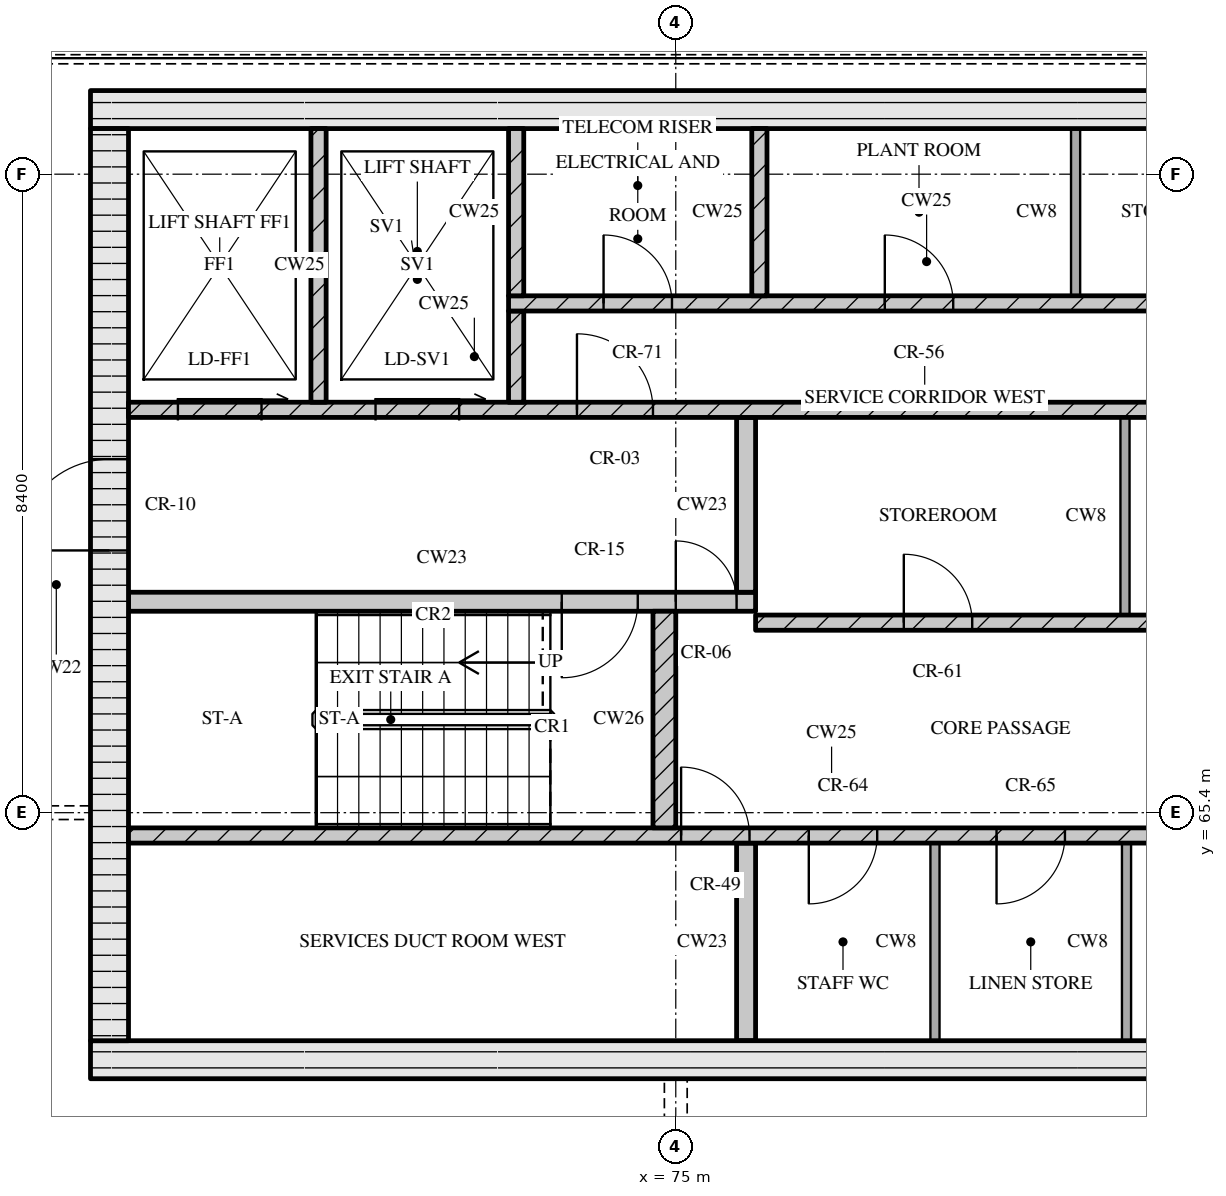
"""IFC4 building model, lengths in metres.
Left out: names, types, materials, properties, quantities, classifications, styles, units other than length and angle.
Written with IfcOpenShell. Run it as: python <this file> out.ifc"""

import sys

from ifc_helpers import new_model, si_unit, direction, frame, frame_2d, origin, place, context, subcontext, project, spatial, rectangle, extrude, element, fill, save


model = new_model("IFC4")
c1 = context("Model", 3, precision=1e-05, world=origin(), true_north=direction((0.0, 1.0)))
c2 = subcontext(c1, "Body", "Model", "MODEL_VIEW")
j1 = project(units=[si_unit("LENGTHUNIT", "METRE"), si_unit("PLANEANGLEUNIT", "RADIAN")], contexts=[c1])
p1 = place(None, origin())
s1 = spatial("IfcSite", under=j1, at=p1, CompositionType="ELEMENT")
p2 = place(p1, origin())
s2 = spatial("IfcBuilding", under=s1, at=p2, CompositionType="ELEMENT")
p3 = place(p2, frame((0.0, 0.0, 310.35)))
s3 = spatial("IfcBuildingStorey", under=s2, at=p3, CompositionType="ELEMENT", Elevation=310.35)
p4 = place(p3, frame((67.3, 62.15, 0.0), z_axis=(0.0, 0.0, 1.0), x_axis=(1.0, 0.0, 0.0)))
e1 = element("IfcWall", 1, at=p4, inside=s3, PredefinedType="SOLIDWALL", context=c2, shape_type="SweptSolid", body=[
    extrude(rectangle(XDim=40.6, YDim=0.5, at=frame_2d((20.3, 0.0))), origin(), (0.0, 0.0, 1.0), 4.2),
])
p5 = place(p4, frame((20.65, 0.0, 0.0)))
e2 = element("IfcOpeningElement", 2, at=p5, cuts=e1, PredefinedType="OPENING", context=c2, shape_type="SweptSolid", body=[
    extrude(rectangle(XDim=1.8, YDim=2.1, at=frame_2d((0.9, 1.05))), frame((0.0, 0.26, 0.0), z_axis=(0.0, -1.0, 0.0), x_axis=(1.0, 0.0, 0.0)), (0.0, 0.0, 1.0), 0.52),
])
p6 = place(p3, frame((67.3, 74.65, 0.0), z_axis=(0.0, 0.0, 1.0), x_axis=(1.0, 0.0, 0.0)))
e3 = element("IfcWall", 3, at=p6, inside=s3, PredefinedType="SOLIDWALL", context=c2, shape_type="SweptSolid", body=[
    extrude(rectangle(XDim=40.6, YDim=0.5, at=frame_2d((20.3, 0.0))), origin(), (0.0, 0.0, 1.0), 4.2),
])
p7 = place(p3, frame((67.55, 62.4, 0.0), z_axis=(0.0, 0.0, 1.0), x_axis=(0.0, 1.0, 0.0)))
e4 = element("IfcWall", 4, at=p7, inside=s3, PredefinedType="SOLIDWALL", context=c2, shape_type="SweptSolid", body=[
    extrude(rectangle(XDim=12.0, YDim=0.5, at=frame_2d((6.0, 0.0))), origin(), (0.0, 0.0, 1.0), 4.2),
])
p8 = place(p7, frame((6.45, 0.0, 0.0)))
e5 = element("IfcOpeningElement", 5, at=p8, cuts=e4, PredefinedType="OPENING", context=c2, shape_type="SweptSolid", body=[
    extrude(rectangle(XDim=1.2, YDim=2.1, at=frame_2d((0.6, 1.05))), frame((0.0, 0.26, 0.0), z_axis=(0.0, -1.0, 0.0), x_axis=(1.0, 0.0, 0.0)), (0.0, 0.0, 1.0), 0.52),
])
p9 = place(p3, frame((75.925, 62.4, 0.0), z_axis=(0.0, 0.0, 1.0), x_axis=(0.0, 1.0, 0.0)))
e6 = element("IfcWall", 6, at=p9, inside=s3, PredefinedType="SOLIDWALL", context=c2, shape_type="SweptSolid", body=[
    extrude(rectangle(XDim=2.6, YDim=0.25, at=frame_2d((1.3, 0.0))), origin(), (0.0, 0.0, 1.0), 4.2),
])
for number, where, z_axis, x_axis in (
    (7, (78.41, 62.4, 0.0), (0.0, 0.0, 1.0), (0.0, 1.0, 0.0)),
    (8, (80.93, 62.4, 0.0), (0.0, 0.0, 1.0), (0.0, 1.0, 0.0)),
):
    element("IfcWall", number, at=place(p3, frame(where, z_axis=z_axis, x_axis=x_axis)), inside=s3, PredefinedType="PARTITIONING", context=c2, shape_type="SweptSolid", body=[
        extrude(rectangle(XDim=2.6, YDim=0.12, at=frame_2d((1.3, 0.0))), origin(), (0.0, 0.0, 1.0), 4.2),
    ])
p10 = place(p3, frame((67.8, 65.1, 0.0), z_axis=(0.0, 0.0, 1.0), x_axis=(1.0, 0.0, 0.0)))
e9 = element("IfcWall", 9, at=p10, inside=s3, PredefinedType="SOLIDWALL", context=c2, shape_type="SweptSolid", body=[
    extrude(rectangle(XDim=18.5, YDim=0.2, at=frame_2d((9.25, 0.0))), origin(), (0.0, 0.0, 1.0), 4.2),
])
p11 = place(p10, frame((7.27, 0.0, 0.0)))
e10 = element("IfcOpeningElement", 10, at=p11, cuts=e9, PredefinedType="OPENING", context=c2, shape_type="SweptSolid", body=[
    extrude(rectangle(XDim=0.9, YDim=2.1, at=frame_2d((0.45, 1.05))), frame((0.0, 0.11, 0.0), z_axis=(0.0, -1.0, 0.0), x_axis=(1.0, 0.0, 0.0)), (0.0, 0.0, 1.0), 0.22),
])
p12 = place(p10, frame((8.95, 0.0, 0.0)))
e11 = element("IfcOpeningElement", 11, at=p12, cuts=e9, PredefinedType="OPENING", context=c2, shape_type="SweptSolid", body=[
    extrude(rectangle(XDim=0.9, YDim=2.1, at=frame_2d((0.45, 1.05))), frame((0.0, 0.11, 0.0), z_axis=(0.0, -1.0, 0.0), x_axis=(1.0, 0.0, 0.0)), (0.0, 0.0, 1.0), 0.22),
])
p13 = place(p10, frame((11.42, 0.0, 0.0)))
e12 = element("IfcOpeningElement", 12, at=p13, cuts=e9, PredefinedType="OPENING", context=c2, shape_type="SweptSolid", body=[
    extrude(rectangle(XDim=0.9, YDim=2.1, at=frame_2d((0.45, 1.05))), frame((0.0, 0.11, 0.0), z_axis=(0.0, -1.0, 0.0), x_axis=(1.0, 0.0, 0.0)), (0.0, 0.0, 1.0), 0.22),
])
p14 = place(p10, frame((13.92, 0.0, 0.0)))
e13 = element("IfcOpeningElement", 13, at=p14, cuts=e9, PredefinedType="OPENING", context=c2, shape_type="SweptSolid", body=[
    extrude(rectangle(XDim=0.9, YDim=2.1, at=frame_2d((0.45, 1.05))), frame((0.0, 0.11, 0.0), z_axis=(0.0, -1.0, 0.0), x_axis=(1.0, 0.0, 0.0)), (0.0, 0.0, 1.0), 0.22),
])
p15 = place(p10, frame((16.7, 0.0, 0.0)))
e14 = element("IfcOpeningElement", 14, at=p15, cuts=e9, PredefinedType="OPENING", context=c2, shape_type="SweptSolid", body=[
    extrude(rectangle(XDim=0.9, YDim=2.1, at=frame_2d((0.45, 1.05))), frame((0.0, 0.11, 0.0), z_axis=(0.0, -1.0, 0.0), x_axis=(1.0, 0.0, 0.0)), (0.0, 0.0, 1.0), 0.22),
])
p16 = place(p3, frame((74.85, 65.2, 0.0), z_axis=(0.0, 0.0, 1.0), x_axis=(0.0, 1.0, 0.0)))
e15 = element("IfcWall", 15, at=p16, inside=s3, PredefinedType="SOLIDWALL", context=c2, shape_type="SweptSolid", body=[
    extrude(rectangle(XDim=2.85, YDim=0.3, at=frame_2d((1.425, 0.0))), origin(), (0.0, 0.0, 1.0), 4.2),
])
p17 = place(p3, frame((76.05, 67.9, 0.0), z_axis=(0.0, 0.0, 1.0), x_axis=(1.0, 0.0, 0.0)))
e16 = element("IfcWall", 16, at=p17, inside=s3, PredefinedType="SOLIDWALL", context=c2, shape_type="SweptSolid", body=[
    extrude(rectangle(XDim=23.1, YDim=0.2, at=frame_2d((11.55, 0.0))), origin(), (0.0, 0.0, 1.0), 4.2),
])
p18 = place(p17, frame((1.95, 0.0, 0.0)))
e17 = element("IfcOpeningElement", 17, at=p18, cuts=e16, PredefinedType="OPENING", context=c2, shape_type="SweptSolid", body=[
    extrude(rectangle(XDim=0.9, YDim=2.1, at=frame_2d((0.45, 1.05))), frame((0.0, 0.11, 0.0), z_axis=(0.0, -1.0, 0.0), x_axis=(1.0, 0.0, 0.0)), (0.0, 0.0, 1.0), 0.22),
])
p19 = place(p17, frame((5.66, 0.0, 0.0)))
e18 = element("IfcOpeningElement", 18, at=p19, cuts=e16, PredefinedType="OPENING", context=c2, shape_type="SweptSolid", body=[
    extrude(rectangle(XDim=0.9, YDim=2.1, at=frame_2d((0.45, 1.05))), frame((0.0, 0.11, 0.0), z_axis=(0.0, -1.0, 0.0), x_axis=(1.0, 0.0, 0.0)), (0.0, 0.0, 1.0), 0.22),
])
p20 = place(p17, frame((9.7, 0.0, 0.0)))
e19 = element("IfcOpeningElement", 19, at=p20, cuts=e16, PredefinedType="OPENING", context=c2, shape_type="SweptSolid", body=[
    extrude(rectangle(XDim=0.9, YDim=2.1, at=frame_2d((0.45, 1.05))), frame((0.0, 0.11, 0.0), z_axis=(0.0, -1.0, 0.0), x_axis=(1.0, 0.0, 0.0)), (0.0, 0.0, 1.0), 0.22),
])
p21 = place(p17, frame((13.55, 0.0, 0.0)))
e20 = element("IfcOpeningElement", 20, at=p21, cuts=e16, PredefinedType="OPENING", context=c2, shape_type="SweptSolid", body=[
    extrude(rectangle(XDim=1.0, YDim=2.1, at=frame_2d((0.5, 1.05))), frame((0.0, 0.11, 0.0), z_axis=(0.0, -1.0, 0.0), x_axis=(1.0, 0.0, 0.0)), (0.0, 0.0, 1.0), 0.22),
])
p22 = place(p3, frame((80.91, 68.0, 0.0), z_axis=(0.0, 0.0, 1.0), x_axis=(0.0, 1.0, 0.0)))
e21 = element("IfcWall", 21, at=p22, inside=s3, PredefinedType="PARTITIONING", context=c2, shape_type="SweptSolid", body=[
    extrude(rectangle(XDim=2.6, YDim=0.12, at=frame_2d((1.3, 0.0))), origin(), (0.0, 0.0, 1.0), 4.2),
])
p23 = place(p3, frame((67.8, 68.175, 0.0), z_axis=(0.0, 0.0, 1.0), x_axis=(1.0, 0.0, 0.0)))
e22 = element("IfcWall", 22, at=p23, inside=s3, PredefinedType="SOLIDWALL", context=c2, shape_type="SweptSolid", body=[
    extrude(rectangle(XDim=8.25, YDim=0.25, at=frame_2d((4.125, 0.0))), origin(), (0.0, 0.0, 1.0), 4.2),
])
p24 = place(p23, frame((5.7, 0.0, 0.0)))
e23 = element("IfcOpeningElement", 23, at=p24, cuts=e22, PredefinedType="OPENING", context=c2, shape_type="SweptSolid", body=[
    extrude(rectangle(XDim=1.0, YDim=2.1, at=frame_2d((0.5, 1.05))), frame((0.0, 0.135, 0.0), z_axis=(0.0, -1.0, 0.0), x_axis=(1.0, 0.0, 0.0)), (0.0, 0.0, 1.0), 0.27),
])
p25 = place(p23, frame((7.2, 0.0, 0.0)))
e24 = element("IfcOpeningElement", 24, at=p25, cuts=e22, PredefinedType="OPENING", context=c2, shape_type="SweptSolid", body=[
    extrude(rectangle(XDim=0.8, YDim=2.1, at=frame_2d((0.4, 1.05))), frame((0.0, 0.135, 0.0), z_axis=(0.0, -1.0, 0.0), x_axis=(1.0, 0.0, 0.0)), (0.0, 0.0, 1.0), 0.27),
])
p26 = place(p3, frame((75.925, 68.3, 0.0), z_axis=(0.0, 0.0, 1.0), x_axis=(0.0, 1.0, 0.0)))
e25 = element("IfcWall", 25, at=p26, inside=s3, PredefinedType="SOLIDWALL", context=c2, shape_type="SweptSolid", body=[
    extrude(rectangle(XDim=2.3, YDim=0.25, at=frame_2d((1.15, 0.0))), origin(), (0.0, 0.0, 1.0), 4.2),
])
p27 = place(p3, frame((67.8, 70.7, 0.0), z_axis=(0.0, 0.0, 1.0), x_axis=(1.0, 0.0, 0.0)))
e26 = element("IfcWall", 26, at=p27, inside=s3, PredefinedType="SOLIDWALL", context=c2, shape_type="SweptSolid", body=[
    extrude(rectangle(XDim=39.6, YDim=0.2, at=frame_2d((19.8, 0.0))), origin(), (0.0, 0.0, 1.0), 4.2),
])
p28 = place(p27, frame((0.65, 0.0, 0.0)))
e27 = element("IfcOpeningElement", 27, at=p28, cuts=e26, PredefinedType="OPENING", context=c2, shape_type="SweptSolid", body=[
    extrude(rectangle(XDim=1.1, YDim=2.1, at=frame_2d((0.55, 1.05))), frame((0.0, 0.11, 0.0), z_axis=(0.0, -1.0, 0.0), x_axis=(1.0, 0.0, 0.0)), (0.0, 0.0, 1.0), 0.22),
])
p29 = place(p27, frame((3.25, 0.0, 0.0)))
e28 = element("IfcOpeningElement", 28, at=p29, cuts=e26, PredefinedType="OPENING", context=c2, shape_type="SweptSolid", body=[
    extrude(rectangle(XDim=1.1, YDim=2.1, at=frame_2d((0.55, 1.05))), frame((0.0, 0.11, 0.0), z_axis=(0.0, -1.0, 0.0), x_axis=(1.0, 0.0, 0.0)), (0.0, 0.0, 1.0), 0.22),
])
p30 = place(p27, frame((5.9, 0.0, 0.0)))
e29 = element("IfcOpeningElement", 29, at=p30, cuts=e26, PredefinedType="OPENING", context=c2, shape_type="SweptSolid", body=[
    extrude(rectangle(XDim=1.0, YDim=2.1, at=frame_2d((0.5, 1.05))), frame((0.0, 0.11, 0.0), z_axis=(0.0, -1.0, 0.0), x_axis=(1.0, 0.0, 0.0)), (0.0, 0.0, 1.0), 0.22),
])
p31 = place(p27, frame((21.7, 0.0, 0.0)))
e30 = element("IfcOpeningElement", 30, at=p31, cuts=e26, PredefinedType="OPENING", context=c2, shape_type="SweptSolid", body=[
    extrude(rectangle(XDim=1.0, YDim=2.1, at=frame_2d((0.5, 1.05))), frame((0.0, 0.11, 0.0), z_axis=(0.0, -1.0, 0.0), x_axis=(1.0, 0.0, 0.0)), (0.0, 0.0, 1.0), 0.22),
])
p32 = place(p27, frame((32.7, 0.0, 0.0)))
e31 = element("IfcOpeningElement", 31, at=p32, cuts=e26, PredefinedType="OPENING", context=c2, shape_type="SweptSolid", body=[
    extrude(rectangle(XDim=1.0, YDim=2.1, at=frame_2d((0.5, 1.05))), frame((0.0, 0.11, 0.0), z_axis=(0.0, -1.0, 0.0), x_axis=(1.0, 0.0, 0.0)), (0.0, 0.0, 1.0), 0.22),
])
p33 = place(p27, frame((35.25, 0.0, 0.0)))
e32 = element("IfcOpeningElement", 32, at=p33, cuts=e26, PredefinedType="OPENING", context=c2, shape_type="SweptSolid", body=[
    extrude(rectangle(XDim=1.1, YDim=2.1, at=frame_2d((0.55, 1.05))), frame((0.0, 0.11, 0.0), z_axis=(0.0, -1.0, 0.0), x_axis=(1.0, 0.0, 0.0)), (0.0, 0.0, 1.0), 0.22),
])
p34 = place(p27, frame((37.85, 0.0, 0.0)))
e33 = element("IfcOpeningElement", 33, at=p34, cuts=e26, PredefinedType="OPENING", context=c2, shape_type="SweptSolid", body=[
    extrude(rectangle(XDim=1.1, YDim=2.1, at=frame_2d((0.55, 1.05))), frame((0.0, 0.11, 0.0), z_axis=(0.0, -1.0, 0.0), x_axis=(1.0, 0.0, 0.0)), (0.0, 0.0, 1.0), 0.22),
])
p35 = place(p3, frame((70.3, 70.8, 0.0), z_axis=(0.0, 0.0, 1.0), x_axis=(0.0, 1.0, 0.0)))
e34 = element("IfcWall", 34, at=p35, inside=s3, PredefinedType="SOLIDWALL", context=c2, shape_type="SweptSolid", body=[
    extrude(rectangle(XDim=3.6, YDim=0.2, at=frame_2d((1.8, 0.0))), origin(), (0.0, 0.0, 1.0), 4.2),
])
p36 = place(p3, frame((72.9, 70.8, 0.0), z_axis=(0.0, 0.0, 1.0), x_axis=(0.0, 1.0, 0.0)))
e35 = element("IfcWall", 35, at=p36, inside=s3, PredefinedType="SOLIDWALL", context=c2, shape_type="SweptSolid", body=[
    extrude(rectangle(XDim=1.2, YDim=0.2, at=frame_2d((0.6, 0.0))), origin(), (0.0, 0.0, 1.0), 4.2),
])
p37 = place(p3, frame((72.8, 72.1, 0.0), z_axis=(0.0, 0.0, 1.0), x_axis=(1.0, 0.0, 0.0)))
e36 = element("IfcWall", 36, at=p37, inside=s3, PredefinedType="SOLIDWALL", context=c2, shape_type="SweptSolid", body=[
    extrude(rectangle(XDim=11.0, YDim=0.2, at=frame_2d((5.5, 0.0))), origin(), (0.0, 0.0, 1.0), 4.2),
])
p38 = place(p37, frame((1.25, 0.0, 0.0)))
e37 = element("IfcOpeningElement", 37, at=p38, cuts=e36, PredefinedType="OPENING", context=c2, shape_type="SweptSolid", body=[
    extrude(rectangle(XDim=0.9, YDim=2.1, at=frame_2d((0.45, 1.05))), frame((0.0, 0.11, 0.0), z_axis=(0.0, -1.0, 0.0), x_axis=(1.0, 0.0, 0.0)), (0.0, 0.0, 1.0), 0.22),
])
p39 = place(p37, frame((4.95, 0.0, 0.0)))
e38 = element("IfcOpeningElement", 38, at=p39, cuts=e36, PredefinedType="OPENING", context=c2, shape_type="SweptSolid", body=[
    extrude(rectangle(XDim=0.9, YDim=2.1, at=frame_2d((0.45, 1.05))), frame((0.0, 0.11, 0.0), z_axis=(0.0, -1.0, 0.0), x_axis=(1.0, 0.0, 0.0)), (0.0, 0.0, 1.0), 0.22),
])
p40 = place(p37, frame((8.685, 0.0, 0.0)))
e39 = element("IfcOpeningElement", 39, at=p40, cuts=e36, PredefinedType="OPENING", context=c2, shape_type="SweptSolid", body=[
    extrude(rectangle(XDim=0.9, YDim=2.1, at=frame_2d((0.45, 1.05))), frame((0.0, 0.11, 0.0), z_axis=(0.0, -1.0, 0.0), x_axis=(1.0, 0.0, 0.0)), (0.0, 0.0, 1.0), 0.22),
])
for number, where, z_axis, x_axis in (
    (40, (72.9, 72.2, 0.0), (0.0, 0.0, 1.0), (0.0, 1.0, 0.0)),
    (41, (76.1, 72.2, 0.0), (0.0, 0.0, 1.0), (0.0, 1.0, 0.0)),
):
    element("IfcWall", number, at=place(p3, frame(where, z_axis=z_axis, x_axis=x_axis)), inside=s3, PredefinedType="SOLIDWALL", context=c2, shape_type="SweptSolid", body=[
        extrude(rectangle(XDim=2.2, YDim=0.2, at=frame_2d((1.1, 0.0))), origin(), (0.0, 0.0, 1.0), 4.2),
    ])
p41 = place(p3, frame((80.26, 72.2, 0.0), z_axis=(0.0, 0.0, 1.0), x_axis=(0.0, 1.0, 0.0)))
e42 = element("IfcWall", 42, at=p41, inside=s3, PredefinedType="PARTITIONING", context=c2, shape_type="SweptSolid", body=[
    extrude(rectangle(XDim=2.2, YDim=0.12, at=frame_2d((1.1, 0.0))), origin(), (0.0, 0.0, 1.0), 4.2),
])
p42 = place(p11, origin())
e43 = element("IfcDoor", 43, at=p42, inside=s3, OperationType="SINGLE_SWING_LEFT", PredefinedType="DOOR", context=c2, shape_type="SweptSolid", body=[
    extrude(rectangle(XDim=0.9, YDim=2.1, at=frame_2d((0.45, 1.05))), frame((0.0, 0.025, 0.0), z_axis=(0.0, -1.0, 0.0), x_axis=(1.0, 0.0, 0.0)), (0.0, 0.0, 1.0), 0.05),
])
fill(e10, e43)
p43 = place(p12, origin())
e44 = element("IfcDoor", 44, at=p43, inside=s3, OperationType="SINGLE_SWING_RIGHT", PredefinedType="DOOR", context=c2, shape_type="SweptSolid", body=[
    extrude(rectangle(XDim=0.9, YDim=2.1, at=frame_2d((0.45, 1.05))), frame((0.0, 0.025, 0.0), z_axis=(0.0, -1.0, 0.0), x_axis=(1.0, 0.0, 0.0)), (0.0, 0.0, 1.0), 0.05),
])
fill(e11, e44)
p44 = place(p13, origin())
e45 = element("IfcDoor", 45, at=p44, inside=s3, OperationType="SINGLE_SWING_RIGHT", PredefinedType="DOOR", context=c2, shape_type="SweptSolid", body=[
    extrude(rectangle(XDim=0.9, YDim=2.1, at=frame_2d((0.45, 1.05))), frame((0.0, 0.025, 0.0), z_axis=(0.0, -1.0, 0.0), x_axis=(1.0, 0.0, 0.0)), (0.0, 0.0, 1.0), 0.05),
])
fill(e12, e45)
p45 = place(p18, origin())
e46 = element("IfcDoor", 46, at=p45, inside=s3, OperationType="SINGLE_SWING_LEFT", PredefinedType="DOOR", context=c2, shape_type="SweptSolid", body=[
    extrude(rectangle(XDim=0.9, YDim=2.1, at=frame_2d((0.45, 1.05))), frame((0.0, 0.025, 0.0), z_axis=(0.0, -1.0, 0.0), x_axis=(1.0, 0.0, 0.0)), (0.0, 0.0, 1.0), 0.05),
])
fill(e17, e46)
p46 = place(p24, origin())
e47 = element("IfcDoor", 47, at=p46, inside=s3, OperationType="SINGLE_SWING_RIGHT", PredefinedType="DOOR", context=c2, shape_type="SweptSolid", body=[
    extrude(rectangle(XDim=1.0, YDim=2.1, at=frame_2d((0.5, 1.05))), frame((0.0, 0.025, 0.0), z_axis=(0.0, -1.0, 0.0), x_axis=(1.0, 0.0, 0.0)), (0.0, 0.0, 1.0), 0.05),
])
fill(e23, e47)
p47 = place(p25, origin())
e48 = element("IfcDoor", 48, at=p47, inside=s3, OperationType="SINGLE_SWING_LEFT", PredefinedType="DOOR", context=c2, shape_type="SweptSolid", body=[
    extrude(rectangle(XDim=0.8, YDim=2.1, at=frame_2d((0.4, 1.05))), frame((0.0, 0.025, 0.0), z_axis=(0.0, -1.0, 0.0), x_axis=(1.0, 0.0, 0.0)), (0.0, 0.0, 1.0), 0.05),
])
fill(e24, e48)
p48 = place(p8, origin())
e49 = element("IfcDoor", 49, at=p48, inside=s3, OperationType="SINGLE_SWING_LEFT", PredefinedType="DOOR", context=c2, shape_type="SweptSolid", body=[
    extrude(rectangle(XDim=1.2, YDim=2.1, at=frame_2d((0.6, 1.05))), frame((0.0, 0.025, 0.0), z_axis=(0.0, -1.0, 0.0), x_axis=(1.0, 0.0, 0.0)), (0.0, 0.0, 1.0), 0.05),
])
fill(e5, e49)
p49 = place(p28, origin())
e50 = element("IfcDoor", 50, at=p49, inside=s3, OperationType="SLIDING_TO_RIGHT", PredefinedType="DOOR", context=c2, shape_type="SweptSolid", body=[
    extrude(rectangle(XDim=1.1, YDim=2.1, at=frame_2d((0.55, 1.05))), frame((0.0, 0.025, 0.0), z_axis=(0.0, -1.0, 0.0), x_axis=(1.0, 0.0, 0.0)), (0.0, 0.0, 1.0), 0.05),
])
fill(e27, e50)
p50 = place(p29, origin())
e51 = element("IfcDoor", 51, at=p50, inside=s3, OperationType="SLIDING_TO_RIGHT", PredefinedType="DOOR", context=c2, shape_type="SweptSolid", body=[
    extrude(rectangle(XDim=1.1, YDim=2.1, at=frame_2d((0.55, 1.05))), frame((0.0, 0.025, 0.0), z_axis=(0.0, -1.0, 0.0), x_axis=(1.0, 0.0, 0.0)), (0.0, 0.0, 1.0), 0.05),
])
fill(e28, e51)
p51 = place(p30, origin())
e52 = element("IfcDoor", 52, at=p51, inside=s3, OperationType="SINGLE_SWING_LEFT", PredefinedType="DOOR", context=c2, shape_type="SweptSolid", body=[
    extrude(rectangle(XDim=1.0, YDim=2.1, at=frame_2d((0.5, 1.05))), frame((0.0, 0.025, 0.0), z_axis=(0.0, -1.0, 0.0), x_axis=(1.0, 0.0, 0.0)), (0.0, 0.0, 1.0), 0.05),
])
fill(e29, e52)
p52 = place(p38, origin())
e53 = element("IfcDoor", 53, at=p52, inside=s3, OperationType="SINGLE_SWING_LEFT", PredefinedType="DOOR", context=c2, shape_type="SweptSolid", body=[
    extrude(rectangle(XDim=0.9, YDim=2.1, at=frame_2d((0.45, 1.05))), frame((0.0, 0.025, 0.0), z_axis=(0.0, -1.0, 0.0), x_axis=(1.0, 0.0, 0.0)), (0.0, 0.0, 1.0), 0.05),
])
fill(e37, e53)
p53 = place(p39, origin())
e54 = element("IfcDoor", 54, at=p53, inside=s3, OperationType="SINGLE_SWING_LEFT", PredefinedType="DOOR", context=c2, shape_type="SweptSolid", body=[
    extrude(rectangle(XDim=0.9, YDim=2.1, at=frame_2d((0.45, 1.05))), frame((0.0, 0.025, 0.0), z_axis=(0.0, -1.0, 0.0), x_axis=(1.0, 0.0, 0.0)), (0.0, 0.0, 1.0), 0.05),
])
fill(e38, e54)
save(model, sys.argv[1])
